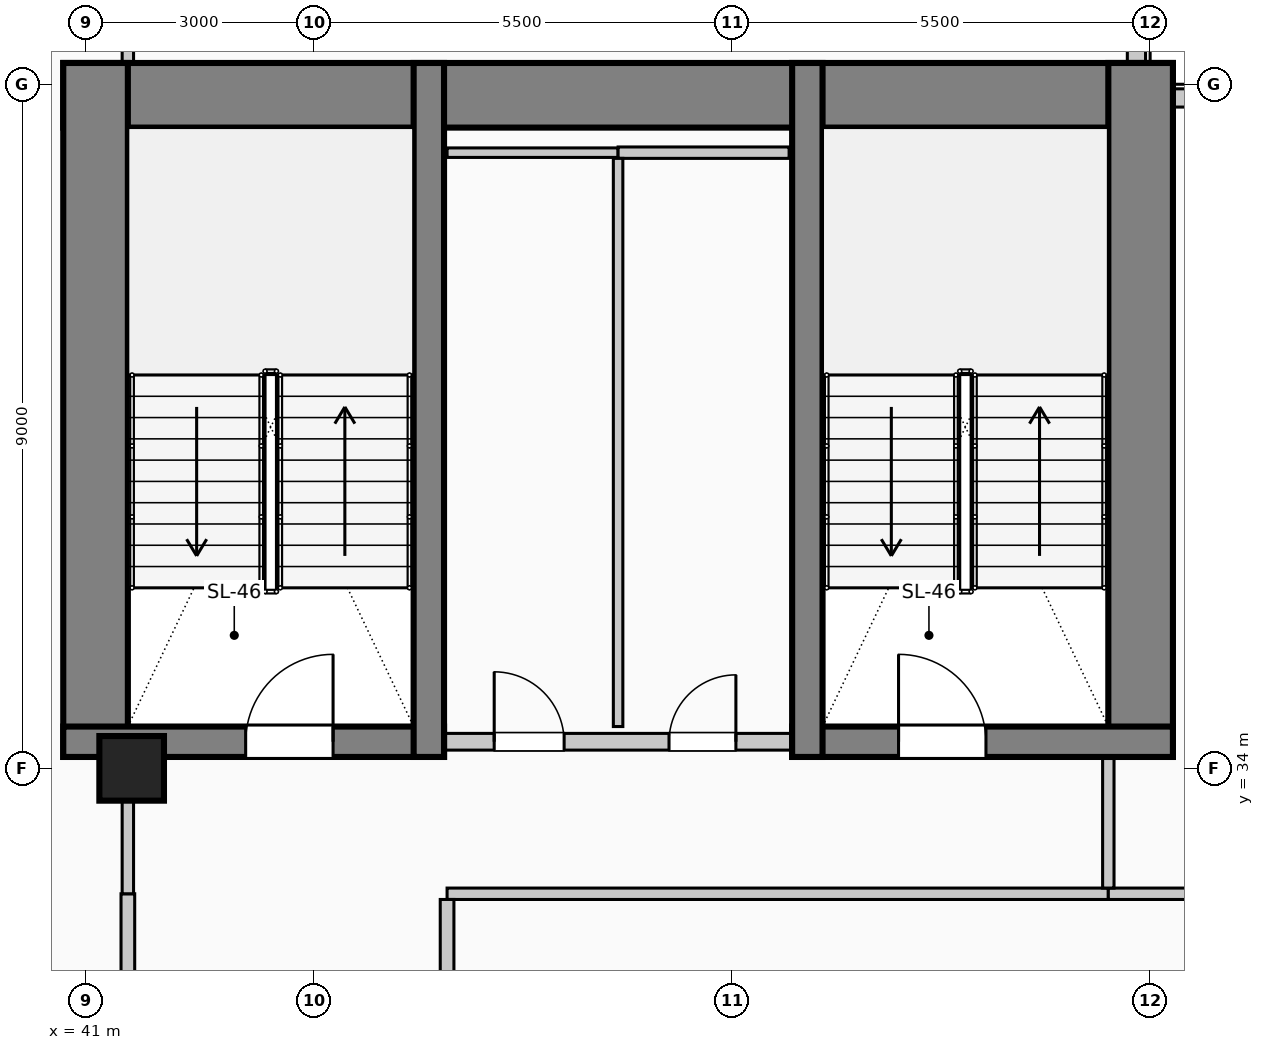
"""IFC4 building model, lengths in metres.
Left out: names, types, materials, properties, quantities, classifications, styles, units other than length and angle.
Written with IfcOpenShell. Run it as: python <this file> out.ifc"""

import sys

from ifc_helpers import new_model, si_unit, direction, frame, frame_2d, origin, origin_2d, place, context, subcontext, project, spatial, rectangle, circle, extrude, element, fill, save


model = new_model("IFC4")
c1 = context("Model", 3, precision=1e-05, world=origin(), true_north=direction((0.0, 1.0)))
c2 = subcontext(c1, "Body", "Model", "MODEL_VIEW")
j1 = project(units=[si_unit("LENGTHUNIT", "METRE"), si_unit("PLANEANGLEUNIT", "RADIAN")], contexts=[c1])
p1 = place(None, origin())
s1 = spatial("IfcSite", under=j1, at=p1, CompositionType="ELEMENT")
p2 = place(p1, origin())
s2 = spatial("IfcBuilding", under=s1, at=p2, CompositionType="ELEMENT")
p3 = place(p2, frame((0.0, 0.0, 174.6)))
s3 = spatial("IfcBuildingStorey", under=s2, at=p3, CompositionType="ELEMENT", Elevation=174.6)
p4 = place(p3, frame((40.7, 42.855, 0.0), z_axis=(0.0, 0.0, 1.0), x_axis=(1.0, 0.0, 0.0)))
e1 = element("IfcWall", 1, at=p4, inside=s3, PredefinedType="SHEAR", context=c2, shape_type="SweptSolid", body=[
    extrude(rectangle(XDim=14.6, YDim=0.85, at=frame_2d((7.3, 0.0))), origin(), (0.0, 0.0, 1.0), 4.0),
])
for number, where, z_axis, x_axis in (
    (2, (41.125, 34.15, 0.0), (0.0, 0.0, 1.0), (0.0, 1.0, 0.0)),
    (3, (54.875, 34.15, 0.0), (0.0, 0.0, 1.0), (0.0, 1.0, 0.0)),
):
    element("IfcWall", number, at=place(p3, frame(where, z_axis=z_axis, x_axis=x_axis)), inside=s3, PredefinedType="SHEAR", context=c2, shape_type="SweptSolid", body=[
        extrude(rectangle(XDim=9.13, YDim=0.85, at=frame_2d((4.565, 0.0))), origin(), (0.0, 0.0, 1.0), 4.0),
    ])
p5 = place(p3, frame((40.7, 34.35, 0.0), z_axis=(0.0, 0.0, 1.0), x_axis=(1.0, 0.0, 0.0)))
e4 = element("IfcWall", 4, at=p5, inside=s3, PredefinedType="SHEAR", context=c2, shape_type="SweptSolid", body=[
    extrude(rectangle(XDim=5.01, YDim=0.4, at=frame_2d((2.505, 0.0))), origin(), (0.0, 0.0, 1.0), 4.0),
])
p6 = place(p5, frame((2.4, 0.0, 0.0)))
e5 = element("IfcOpeningElement", 5, at=p6, cuts=e4, PredefinedType="OPENING", context=c2, shape_type="SweptSolid", body=[
    extrude(rectangle(XDim=1.15, YDim=2.2, at=frame_2d((0.575, 1.1))), frame((0.0, 0.21, 0.0), z_axis=(0.0, -1.0, 0.0), x_axis=(1.0, 0.0, 0.0)), (0.0, 0.0, 1.0), 0.42),
])
p7 = place(p3, frame((45.51, 34.15, 0.0), z_axis=(0.0, 0.0, 1.0), x_axis=(0.0, 1.0, 0.0)))
e6 = element("IfcWall", 6, at=p7, inside=s3, PredefinedType="SHEAR", context=c2, shape_type="SweptSolid", body=[
    extrude(rectangle(XDim=9.13, YDim=0.4, at=frame_2d((4.565, 0.0))), origin(), (0.0, 0.0, 1.0), 4.0),
])
p8 = place(p3, frame((50.29, 34.35, 0.0), z_axis=(0.0, 0.0, 1.0), x_axis=(1.0, 0.0, 0.0)))
e7 = element("IfcWall", 7, at=p8, inside=s3, PredefinedType="SHEAR", context=c2, shape_type="SweptSolid", body=[
    extrude(rectangle(XDim=5.01, YDim=0.4, at=frame_2d((2.505, 0.0))), origin(), (0.0, 0.0, 1.0), 4.0),
])
p9 = place(p8, frame((1.4, 0.0, 0.0)))
e8 = element("IfcOpeningElement", 8, at=p9, cuts=e7, PredefinedType="OPENING", context=c2, shape_type="SweptSolid", body=[
    extrude(rectangle(XDim=1.15, YDim=2.2, at=frame_2d((0.575, 1.1))), frame((0.0, 0.21, 0.0), z_axis=(0.0, -1.0, 0.0), x_axis=(1.0, 0.0, 0.0)), (0.0, 0.0, 1.0), 0.42),
])
p10 = place(p3, frame((50.49, 34.15, 0.0), z_axis=(0.0, 0.0, 1.0), x_axis=(0.0, 1.0, 0.0)))
e9 = element("IfcWall", 9, at=p10, inside=s3, PredefinedType="SHEAR", context=c2, shape_type="SweptSolid", body=[
    extrude(rectangle(XDim=9.13, YDim=0.4, at=frame_2d((4.565, 0.0))), origin(), (0.0, 0.0, 1.0), 4.0),
])
p11 = place(p3, frame((41.6, 34.0, 0.0), z_axis=(0.0, 0.0, 1.0), x_axis=(1.0, 0.0, 0.0)))
e10 = element("IfcColumn", 10, at=p11, inside=s3, PredefinedType="COLUMN", context=c2, shape_type="SweptSolid", body=[
    extrude(circle(Radius=0.425, at=origin_2d()), origin(), (0.0, 0.0, 1.0), 4.0),
])
p12 = place(p3, frame((54.82, 45.4, 0.0), z_axis=(0.0, 0.0, 1.0), x_axis=(0.0, -1.0, 0.0)))
e11 = element("IfcWall", 11, at=p12, inside=s3, PredefinedType="SOLIDWALL", context=c2, shape_type="SweptSolid", body=[
    extrude(rectangle(XDim=2.115, YDim=0.24, at=frame_2d((1.058, 0.0))), origin(), (0.0, 0.0, 1.0), 3.725),
])
p13 = place(p3, frame((55.305, 42.82, 0.0), z_axis=(0.0, 0.0, 1.0), x_axis=(1.0, 0.0, 0.0)))
e12 = element("IfcWall", 12, at=p13, inside=s3, PredefinedType="SOLIDWALL", context=c2, shape_type="SweptSolid", body=[
    extrude(rectangle(XDim=2.095, YDim=0.24, at=frame_2d((1.047, 0.0))), origin(), (0.0, 0.0, 1.0), 3.725),
])
p14 = place(p3, frame((45.72, 34.35, 0.0), z_axis=(0.0, 0.0, 1.0), x_axis=(1.0, 0.0, 0.0)))
e13 = element("IfcWall", 13, at=p14, inside=s3, PredefinedType="PARTITIONING", context=c2, shape_type="SweptSolid", body=[
    extrude(rectangle(XDim=4.56, YDim=0.22, at=frame_2d((2.28, 0.0))), origin(), (0.0, 0.0, 1.0), 3.725),
])
p15 = place(p14, frame((0.65, 0.0, 0.0)))
e14 = element("IfcOpeningElement", 14, at=p15, cuts=e13, PredefinedType="OPENING", context=c2, shape_type="SweptSolid", body=[
    extrude(rectangle(XDim=0.92, YDim=2.1, at=frame_2d((0.46, 1.05))), frame((0.0, 0.12, 0.0), z_axis=(0.0, -1.0, 0.0), x_axis=(1.0, 0.0, 0.0)), (0.0, 0.0, 1.0), 0.24),
])
p16 = place(p14, frame((2.95, 0.0, 0.0)))
e15 = element("IfcOpeningElement", 15, at=p16, cuts=e13, PredefinedType="OPENING", context=c2, shape_type="SweptSolid", body=[
    extrude(rectangle(XDim=0.88, YDim=2.1, at=frame_2d((0.44, 1.05))), frame((0.0, 0.12, 0.0), z_axis=(0.0, -1.0, 0.0), x_axis=(1.0, 0.0, 0.0)), (0.0, 0.0, 1.0), 0.24),
])
p17 = place(p3, frame((45.75, 32.35, 0.0), z_axis=(0.0, 0.0, 1.0), x_axis=(1.0, 0.0, 0.0)))
e16 = element("IfcWall", 16, at=p17, inside=s3, PredefinedType="PARTITIONING", context=c2, shape_type="SweptSolid", body=[
    extrude(rectangle(XDim=8.7, YDim=0.15, at=frame_2d((4.35, 0.0))), origin(), (0.0, 0.0, 1.0), 3.725),
])
p18 = place(p3, frame((54.45, 32.35, 0.0), z_axis=(0.0, 0.0, 1.0), x_axis=(1.0, 0.0, 0.0)))
e17 = element("IfcWall", 17, at=p18, inside=s3, PredefinedType="PARTITIONING", context=c2, shape_type="SweptSolid", body=[
    extrude(rectangle(XDim=2.83, YDim=0.15, at=frame_2d((1.415, 0.0))), origin(), (0.0, 0.0, 1.0), 3.725),
])
p19 = place(p3, frame((45.75, 42.1, 0.0), z_axis=(0.0, 0.0, 1.0), x_axis=(1.0, 0.0, 0.0)))
e18 = element("IfcWall", 18, at=p19, inside=s3, PredefinedType="PARTITIONING", context=c2, shape_type="SweptSolid", body=[
    extrude(rectangle(XDim=2.25, YDim=0.125, at=frame_2d((1.125, 0.0))), origin(), (0.0, 0.0, 1.0), 3.725),
])
p20 = place(p3, frame((48.0, 42.1, 0.0), z_axis=(0.0, 0.0, 1.0), x_axis=(1.0, 0.0, 0.0)))
e19 = element("IfcWall", 19, at=p20, inside=s3, PredefinedType="PARTITIONING", context=c2, shape_type="SweptSolid", body=[
    extrude(rectangle(XDim=2.25, YDim=0.15, at=frame_2d((1.125, 0.0))), origin(), (0.0, 0.0, 1.0), 3.725),
])
p21 = place(p3, frame((41.55, 29.14, 0.0), z_axis=(0.0, 0.0, 1.0), x_axis=(0.0, 1.0, 0.0)))
e20 = element("IfcWall", 20, at=p21, inside=s3, PredefinedType="PARTITIONING", context=c2, shape_type="SweptSolid", body=[
    extrude(rectangle(XDim=3.21, YDim=0.18, at=frame_2d((1.605, 0.0))), origin(), (0.0, 0.0, 1.0), 3.12),
])
p22 = place(p3, frame((41.55, 32.35, 0.0), z_axis=(0.0, 0.0, 1.0), x_axis=(0.0, 1.0, 0.0)))
e21 = element("IfcWall", 21, at=p22, inside=s3, PredefinedType="PARTITIONING", context=c2, shape_type="SweptSolid", body=[
    extrude(rectangle(XDim=1.225, YDim=0.15, at=frame_2d((0.612, 0.0))), origin(), (0.0, 0.0, 1.0), 3.12),
])
p23 = place(p3, frame((41.55, 43.28, 0.0), z_axis=(0.0, 0.0, 1.0), x_axis=(0.0, 1.0, 0.0)))
e22 = element("IfcWall", 22, at=p23, inside=s3, PredefinedType="PARTITIONING", context=c2, shape_type="SweptSolid", body=[
    extrude(rectangle(XDim=1.47, YDim=0.15, at=frame_2d((0.735, 0.0))), origin(), (0.0, 0.0, 1.0), 3.725),
])
p24 = place(p3, frame((45.75, 29.14, 0.0), z_axis=(0.0, 0.0, 1.0), x_axis=(0.0, 1.0, 0.0)))
e23 = element("IfcWall", 23, at=p24, inside=s3, PredefinedType="PARTITIONING", context=c2, shape_type="SweptSolid", body=[
    extrude(rectangle(XDim=3.135, YDim=0.18, at=frame_2d((1.567, 0.0))), origin(), (0.0, 0.0, 1.0), 3.725),
])
p25 = place(p3, frame((48.0, 34.55, 0.0), z_axis=(0.0, 0.0, 1.0), x_axis=(0.0, 1.0, 0.0)))
e24 = element("IfcWall", 24, at=p25, inside=s3, PredefinedType="PARTITIONING", context=c2, shape_type="SweptSolid", body=[
    extrude(rectangle(XDim=7.475, YDim=0.125, at=frame_2d((3.737, 0.0))), origin(), (0.0, 0.0, 1.0), 3.725),
])
p26 = place(p3, frame((54.45, 32.425, 0.0), z_axis=(0.0, 0.0, 1.0), x_axis=(0.0, 1.0, 0.0)))
e25 = element("IfcWall", 25, at=p26, inside=s3, PredefinedType="PARTITIONING", context=c2, shape_type="SweptSolid", body=[
    extrude(rectangle(XDim=1.725, YDim=0.15, at=frame_2d((0.862, 0.0))), origin(), (0.0, 0.0, 1.0), 3.725),
])
p27 = place(p6, origin())
e26 = element("IfcDoor", 26, at=p27, inside=s3, OperationType="SINGLE_SWING_RIGHT", PredefinedType="DOOR", context=c2, shape_type="SweptSolid", body=[
    extrude(rectangle(XDim=1.15, YDim=2.2, at=frame_2d((0.575, 1.1))), frame((0.0, 0.025, 0.0), z_axis=(0.0, -1.0, 0.0), x_axis=(1.0, 0.0, 0.0)), (0.0, 0.0, 1.0), 0.05),
])
fill(e5, e26)
p28 = place(p15, origin())
e27 = element("IfcDoor", 27, at=p28, inside=s3, OperationType="SINGLE_SWING_LEFT", PredefinedType="DOOR", context=c2, shape_type="SweptSolid", body=[
    extrude(rectangle(XDim=0.92, YDim=2.1, at=frame_2d((0.46, 1.05))), frame((0.0, 0.025, 0.0), z_axis=(0.0, -1.0, 0.0), x_axis=(1.0, 0.0, 0.0)), (0.0, 0.0, 1.0), 0.05),
])
fill(e14, e27)
p29 = place(p16, origin())
e28 = element("IfcDoor", 28, at=p29, inside=s3, OperationType="SINGLE_SWING_RIGHT", PredefinedType="DOOR", context=c2, shape_type="SweptSolid", body=[
    extrude(rectangle(XDim=0.88, YDim=2.1, at=frame_2d((0.44, 1.05))), frame((0.0, 0.025, 0.0), z_axis=(0.0, -1.0, 0.0), x_axis=(1.0, 0.0, 0.0)), (0.0, 0.0, 1.0), 0.05),
])
fill(e15, e28)
p30 = place(p9, origin())
e29 = element("IfcDoor", 29, at=p30, inside=s3, OperationType="SINGLE_SWING_LEFT", PredefinedType="DOOR", context=c2, shape_type="SweptSolid", body=[
    extrude(rectangle(XDim=1.15, YDim=2.2, at=frame_2d((0.575, 1.1))), frame((0.0, 0.025, 0.0), z_axis=(0.0, -1.0, 0.0), x_axis=(1.0, 0.0, 0.0)), (0.0, 0.0, 1.0), 0.05),
])
fill(e8, e29)
save(model, sys.argv[1])
